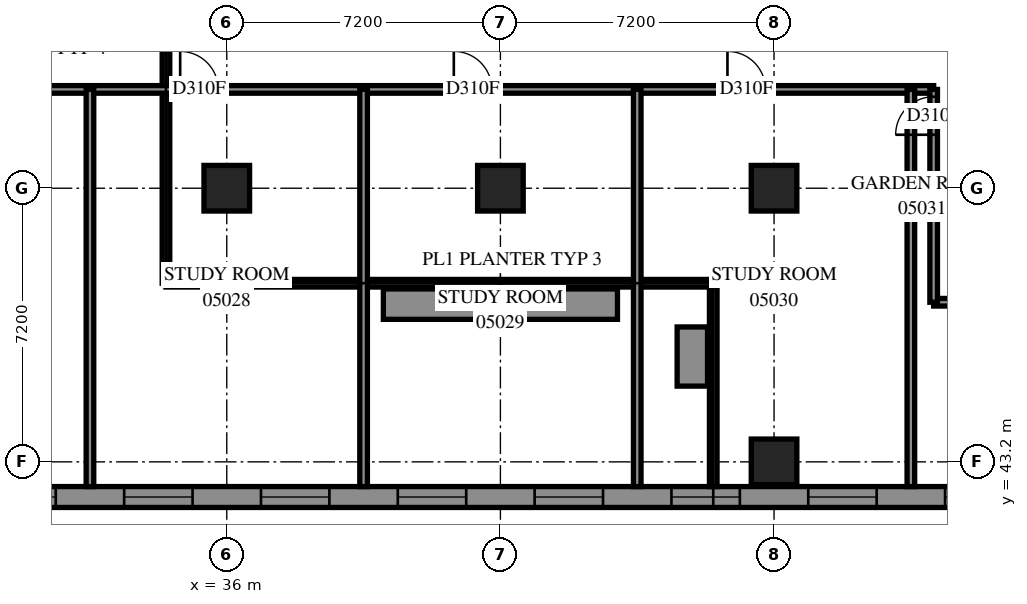
"""IFC4 building model, lengths in metres.
Left out: names, types, materials, properties, quantities, classifications, styles, units other than length and angle.
Written with IfcOpenShell. Run it as: python <this file> out.ifc"""

import sys

from ifc_helpers import new_model, si_unit, direction, frame, frame_2d, origin, origin_2d, place, context, subcontext, project, spatial, polyline, rectangle, outline, extrude, element, fill, save


model = new_model("IFC4")
c1 = context("Model", 3, precision=1e-05, world=origin(), true_north=direction((0.0, 1.0)))
c2 = subcontext(c1, "Body", "Model", "MODEL_VIEW")
j1 = project(units=[si_unit("LENGTHUNIT", "METRE"), si_unit("PLANEANGLEUNIT", "RADIAN")], contexts=[c1])
p1 = place(None, origin())
s1 = spatial("IfcSite", under=j1, at=p1, CompositionType="ELEMENT")
p2 = place(p1, origin())
s2 = spatial("IfcBuilding", under=s1, at=p2, CompositionType="ELEMENT")
p3 = place(p2, frame((0.0, 0.0, 22.8)))
s3 = spatial("IfcBuildingStorey", under=s2, at=p3, CompositionType="ELEMENT", Elevation=22.8)
for number, where, z_axis, x_axis in (
    (1, (36.0, 50.4, 0.0), (0.0, 0.0, 1.0), (1.0, 0.0, 0.0)),
    (2, (43.2, 50.4, 0.0), (0.0, 0.0, 1.0), (1.0, 0.0, 0.0)),
    (3, (50.4, 43.2, 0.0), (0.0, 0.0, 1.0), (1.0, 0.0, 0.0)),
    (4, (50.4, 50.4, 0.0), (0.0, 0.0, 1.0), (1.0, 0.0, 0.0)),
):
    element("IfcColumn", number, at=place(p3, frame(where, z_axis=z_axis, x_axis=x_axis)), inside=s3, PredefinedType="COLUMN", context=c2, shape_type="SweptSolid", body=[
        extrude(rectangle(XDim=1.2, YDim=1.2, at=origin_2d()), origin(), (0.0, 0.0, 1.0), 3.9),
    ])
p4 = place(p3, frame((0.275, 42.275, 0.0), z_axis=(0.0, 0.0, 1.0), x_axis=(1.0, 0.0, 0.0)))
e5 = element("IfcWall", 5, at=p4, inside=s3, PredefinedType="SOLIDWALL", context=c2, shape_type="SweptSolid", body=[
    extrude(outline(polyline([(-0.275, -0.275), (76.681, -0.275), (76.909, 0.275), (0.275, 0.275), (-0.275, -0.275)])), origin(), (0.0, 0.0, 1.0), 3.9),
])
p5 = place(p4, frame((1.0, 0.0, 0.7)))
e6 = element("IfcOpeningElement", 6, at=p5, cuts=e5, PredefinedType="OPENING", context=c2, shape_type="SweptSolid", body=[
    extrude(rectangle(XDim=1.8, YDim=2.4, at=frame_2d((0.9, 1.2))), frame((0.0, 0.285, 0.0), z_axis=(0.0, -1.0, 0.0), x_axis=(1.0, 0.0, 0.0)), (0.0, 0.0, 1.0), 0.57),
])
p6 = place(p4, frame((3.825, 0.0, 0.7)))
e7 = element("IfcOpeningElement", 7, at=p6, cuts=e5, PredefinedType="OPENING", context=c2, shape_type="SweptSolid", body=[
    extrude(rectangle(XDim=1.8, YDim=2.4, at=frame_2d((0.9, 1.2))), frame((0.0, 0.285, 0.0), z_axis=(0.0, -1.0, 0.0), x_axis=(1.0, 0.0, 0.0)), (0.0, 0.0, 1.0), 0.57),
])
p7 = place(p4, frame((7.825, 0.0, 0.7)))
e8 = element("IfcOpeningElement", 8, at=p7, cuts=e5, PredefinedType="OPENING", context=c2, shape_type="SweptSolid", body=[
    extrude(rectangle(XDim=1.8, YDim=2.4, at=frame_2d((0.9, 1.2))), frame((0.0, 0.285, 0.0), z_axis=(0.0, -1.0, 0.0), x_axis=(1.0, 0.0, 0.0)), (0.0, 0.0, 1.0), 0.57),
])
p8 = place(p4, frame((11.425, 0.0, 0.7)))
e9 = element("IfcOpeningElement", 9, at=p8, cuts=e5, PredefinedType="OPENING", context=c2, shape_type="SweptSolid", body=[
    extrude(rectangle(XDim=1.8, YDim=2.4, at=frame_2d((0.9, 1.2))), frame((0.0, 0.285, 0.0), z_axis=(0.0, -1.0, 0.0), x_axis=(1.0, 0.0, 0.0)), (0.0, 0.0, 1.0), 0.57),
])
p9 = place(p4, frame((15.025, 0.0, 0.7)))
e10 = element("IfcOpeningElement", 10, at=p9, cuts=e5, PredefinedType="OPENING", context=c2, shape_type="SweptSolid", body=[
    extrude(rectangle(XDim=1.8, YDim=2.4, at=frame_2d((0.9, 1.2))), frame((0.0, 0.285, 0.0), z_axis=(0.0, -1.0, 0.0), x_axis=(1.0, 0.0, 0.0)), (0.0, 0.0, 1.0), 0.57),
])
p10 = place(p4, frame((18.625, 0.0, 0.7)))
e11 = element("IfcOpeningElement", 11, at=p10, cuts=e5, PredefinedType="OPENING", context=c2, shape_type="SweptSolid", body=[
    extrude(rectangle(XDim=1.8, YDim=2.4, at=frame_2d((0.9, 1.2))), frame((0.0, 0.285, 0.0), z_axis=(0.0, -1.0, 0.0), x_axis=(1.0, 0.0, 0.0)), (0.0, 0.0, 1.0), 0.57),
])
p11 = place(p4, frame((22.225, 0.0, 0.7)))
e12 = element("IfcOpeningElement", 12, at=p11, cuts=e5, PredefinedType="OPENING", context=c2, shape_type="SweptSolid", body=[
    extrude(rectangle(XDim=1.8, YDim=2.4, at=frame_2d((0.9, 1.2))), frame((0.0, 0.285, 0.0), z_axis=(0.0, -1.0, 0.0), x_axis=(1.0, 0.0, 0.0)), (0.0, 0.0, 1.0), 0.57),
])
p12 = place(p4, frame((25.825, 0.0, 0.7)))
e13 = element("IfcOpeningElement", 13, at=p12, cuts=e5, PredefinedType="OPENING", context=c2, shape_type="SweptSolid", body=[
    extrude(rectangle(XDim=1.8, YDim=2.4, at=frame_2d((0.9, 1.2))), frame((0.0, 0.285, 0.0), z_axis=(0.0, -1.0, 0.0), x_axis=(1.0, 0.0, 0.0)), (0.0, 0.0, 1.0), 0.57),
])
p13 = place(p4, frame((29.425, 0.0, 0.7)))
e14 = element("IfcOpeningElement", 14, at=p13, cuts=e5, PredefinedType="OPENING", context=c2, shape_type="SweptSolid", body=[
    extrude(rectangle(XDim=1.8, YDim=2.4, at=frame_2d((0.9, 1.2))), frame((0.0, 0.285, 0.0), z_axis=(0.0, -1.0, 0.0), x_axis=(1.0, 0.0, 0.0)), (0.0, 0.0, 1.0), 0.57),
])
p14 = place(p4, frame((33.025, 0.0, 0.7)))
e15 = element("IfcOpeningElement", 15, at=p14, cuts=e5, PredefinedType="OPENING", context=c2, shape_type="SweptSolid", body=[
    extrude(rectangle(XDim=1.8, YDim=2.4, at=frame_2d((0.9, 1.2))), frame((0.0, 0.285, 0.0), z_axis=(0.0, -1.0, 0.0), x_axis=(1.0, 0.0, 0.0)), (0.0, 0.0, 1.0), 0.57),
])
p15 = place(p4, frame((36.625, 0.0, 0.7)))
e16 = element("IfcOpeningElement", 16, at=p15, cuts=e5, PredefinedType="OPENING", context=c2, shape_type="SweptSolid", body=[
    extrude(rectangle(XDim=1.8, YDim=2.4, at=frame_2d((0.9, 1.2))), frame((0.0, 0.285, 0.0), z_axis=(0.0, -1.0, 0.0), x_axis=(1.0, 0.0, 0.0)), (0.0, 0.0, 1.0), 0.57),
])
p16 = place(p4, frame((40.225, 0.0, 0.7)))
e17 = element("IfcOpeningElement", 17, at=p16, cuts=e5, PredefinedType="OPENING", context=c2, shape_type="SweptSolid", body=[
    extrude(rectangle(XDim=1.8, YDim=2.4, at=frame_2d((0.9, 1.2))), frame((0.0, 0.285, 0.0), z_axis=(0.0, -1.0, 0.0), x_axis=(1.0, 0.0, 0.0)), (0.0, 0.0, 1.0), 0.57),
])
p17 = place(p4, frame((43.825, 0.0, 0.7)))
e18 = element("IfcOpeningElement", 18, at=p17, cuts=e5, PredefinedType="OPENING", context=c2, shape_type="SweptSolid", body=[
    extrude(rectangle(XDim=1.8, YDim=2.4, at=frame_2d((0.9, 1.2))), frame((0.0, 0.285, 0.0), z_axis=(0.0, -1.0, 0.0), x_axis=(1.0, 0.0, 0.0)), (0.0, 0.0, 1.0), 0.57),
])
p18 = place(p4, frame((47.425, 0.0, 0.7)))
e19 = element("IfcOpeningElement", 19, at=p18, cuts=e5, PredefinedType="OPENING", context=c2, shape_type="SweptSolid", body=[
    extrude(rectangle(XDim=1.8, YDim=2.4, at=frame_2d((0.9, 1.2))), frame((0.0, 0.285, 0.0), z_axis=(0.0, -1.0, 0.0), x_axis=(1.0, 0.0, 0.0)), (0.0, 0.0, 1.0), 0.57),
])
p19 = place(p4, frame((51.025, 0.0, 0.7)))
e20 = element("IfcOpeningElement", 20, at=p19, cuts=e5, PredefinedType="OPENING", context=c2, shape_type="SweptSolid", body=[
    extrude(rectangle(XDim=1.8, YDim=2.4, at=frame_2d((0.9, 1.2))), frame((0.0, 0.285, 0.0), z_axis=(0.0, -1.0, 0.0), x_axis=(1.0, 0.0, 0.0)), (0.0, 0.0, 1.0), 0.57),
])
p20 = place(p4, frame((54.625, 0.0, 0.7)))
e21 = element("IfcOpeningElement", 21, at=p20, cuts=e5, PredefinedType="OPENING", context=c2, shape_type="SweptSolid", body=[
    extrude(rectangle(XDim=1.8, YDim=2.4, at=frame_2d((0.9, 1.2))), frame((0.0, 0.285, 0.0), z_axis=(0.0, -1.0, 0.0), x_axis=(1.0, 0.0, 0.0)), (0.0, 0.0, 1.0), 0.57),
])
p21 = place(p4, frame((58.225, 0.0, 0.7)))
e22 = element("IfcOpeningElement", 22, at=p21, cuts=e5, PredefinedType="OPENING", context=c2, shape_type="SweptSolid", body=[
    extrude(rectangle(XDim=1.8, YDim=2.4, at=frame_2d((0.9, 1.2))), frame((0.0, 0.285, 0.0), z_axis=(0.0, -1.0, 0.0), x_axis=(1.0, 0.0, 0.0)), (0.0, 0.0, 1.0), 0.57),
])
p22 = place(p4, frame((61.825, 0.0, 0.7)))
e23 = element("IfcOpeningElement", 23, at=p22, cuts=e5, PredefinedType="OPENING", context=c2, shape_type="SweptSolid", body=[
    extrude(rectangle(XDim=1.8, YDim=2.4, at=frame_2d((0.9, 1.2))), frame((0.0, 0.285, 0.0), z_axis=(0.0, -1.0, 0.0), x_axis=(1.0, 0.0, 0.0)), (0.0, 0.0, 1.0), 0.57),
])
p23 = place(p4, frame((65.425, 0.0, 0.7)))
e24 = element("IfcOpeningElement", 24, at=p23, cuts=e5, PredefinedType="OPENING", context=c2, shape_type="SweptSolid", body=[
    extrude(rectangle(XDim=1.8, YDim=2.4, at=frame_2d((0.9, 1.2))), frame((0.0, 0.285, 0.0), z_axis=(0.0, -1.0, 0.0), x_axis=(1.0, 0.0, 0.0)), (0.0, 0.0, 1.0), 0.57),
])
p24 = place(p4, frame((69.025, 0.0, 0.7)))
e25 = element("IfcOpeningElement", 25, at=p24, cuts=e5, PredefinedType="OPENING", context=c2, shape_type="SweptSolid", body=[
    extrude(rectangle(XDim=1.8, YDim=2.4, at=frame_2d((0.9, 1.2))), frame((0.0, 0.285, 0.0), z_axis=(0.0, -1.0, 0.0), x_axis=(1.0, 0.0, 0.0)), (0.0, 0.0, 1.0), 0.57),
])
p25 = place(p4, frame((72.625, 0.0, 0.7)))
e26 = element("IfcOpeningElement", 26, at=p25, cuts=e5, PredefinedType="OPENING", context=c2, shape_type="SweptSolid", body=[
    extrude(rectangle(XDim=1.8, YDim=2.4, at=frame_2d((0.9, 1.2))), frame((0.0, 0.285, 0.0), z_axis=(0.0, -1.0, 0.0), x_axis=(1.0, 0.0, 0.0)), (0.0, 0.0, 1.0), 0.57),
])
p26 = place(p3, frame((48.8, 42.55, 0.0), z_axis=(0.0, 0.0, 1.0), x_axis=(0.0, 1.0, 0.0)))
e27 = element("IfcWall", 27, at=p26, inside=s3, PredefinedType="PARAPET", context=c2, shape_type="SweptSolid", body=[
    extrude(outline(polyline([(0.0, -0.1), (5.45, -0.1), (5.25, 0.1), (0.0, 0.1), (0.0, -0.1)])), origin(), (0.0, 0.0, 1.0), 0.25),
])
p27 = place(p3, frame((48.8, 47.9, 0.0), z_axis=(0.0, 0.0, 1.0), x_axis=(-1.0, 0.0, 0.0)))
e28 = element("IfcWall", 28, at=p27, inside=s3, PredefinedType="PARAPET", context=c2, shape_type="SweptSolid", body=[
    extrude(outline(polyline([(-0.1, -0.1), (14.3, -0.1), (14.5, 0.1), (0.1, 0.1), (-0.1, -0.1)])), origin(), (0.0, 0.0, 1.0), 0.25),
])
p28 = place(p3, frame((34.4, 47.9, 0.0), z_axis=(0.0, 0.0, 1.0), x_axis=(0.0, 1.0, 0.0)))
e29 = element("IfcWall", 29, at=p28, inside=s3, PredefinedType="PARAPET", context=c2, shape_type="SweptSolid", body=[
    extrude(outline(polyline([(0.1, -0.1), (8.2, -0.1), (8.0, 0.1), (-0.1, 0.1), (0.1, -0.1)])), origin(), (0.0, 0.0, 1.0), 0.25),
])
p29 = place(p3, frame((46.28, 47.35, 0.0), z_axis=(0.0, 0.0, 1.0), x_axis=(-1.0, 0.0, 0.0)))
e30 = element("IfcWall", 30, at=p29, inside=s3, PredefinedType="SOLIDWALL", context=c2, shape_type="SweptSolid", body=[
    extrude(rectangle(XDim=6.16, YDim=0.8, at=frame_2d((3.08, 0.0))), origin(), (0.0, 0.0, 1.0), 0.65),
])
p30 = place(p3, frame((0.0, 53.0, 0.0), z_axis=(0.0, 0.0, 1.0), x_axis=(1.0, 0.0, 0.0)))
e31 = element("IfcWall", 31, at=p30, inside=s3, PredefinedType="PARTITIONING", context=c2, shape_type="SweptSolid", body=[
    extrude(rectangle(XDim=54.6, YDim=0.2, at=frame_2d((27.3, 0.0))), origin(), (0.0, 0.0, 1.0), 3.9),
])
p31 = place(p30, frame((8.689, 0.0, 0.0)))
e32 = element("IfcOpeningElement", 32, at=p31, cuts=e31, PredefinedType="OPENING", context=c2, shape_type="SweptSolid", body=[
    extrude(rectangle(XDim=1.0, YDim=2.1, at=frame_2d((0.5, 1.05))), frame((0.0, 0.11, 0.0), z_axis=(0.0, -1.0, 0.0), x_axis=(1.0, 0.0, 0.0)), (0.0, 0.0, 1.0), 0.22),
])
p32 = place(p30, frame((13.174, 0.0, 0.0)))
e33 = element("IfcOpeningElement", 33, at=p32, cuts=e31, PredefinedType="OPENING", context=c2, shape_type="SweptSolid", body=[
    extrude(rectangle(XDim=1.0, YDim=2.1, at=frame_2d((0.5, 1.05))), frame((0.0, 0.11, 0.0), z_axis=(0.0, -1.0, 0.0), x_axis=(1.0, 0.0, 0.0)), (0.0, 0.0, 1.0), 0.22),
])
p33 = place(p30, frame((20.374, 0.0, 0.0)))
e34 = element("IfcOpeningElement", 34, at=p33, cuts=e31, PredefinedType="OPENING", context=c2, shape_type="SweptSolid", body=[
    extrude(rectangle(XDim=1.0, YDim=2.1, at=frame_2d((0.5, 1.05))), frame((0.0, 0.11, 0.0), z_axis=(0.0, -1.0, 0.0), x_axis=(1.0, 0.0, 0.0)), (0.0, 0.0, 1.0), 0.22),
])
p34 = place(p30, frame((27.574, 0.0, 0.0)))
e35 = element("IfcOpeningElement", 35, at=p34, cuts=e31, PredefinedType="OPENING", context=c2, shape_type="SweptSolid", body=[
    extrude(rectangle(XDim=1.0, YDim=2.1, at=frame_2d((0.5, 1.05))), frame((0.0, 0.11, 0.0), z_axis=(0.0, -1.0, 0.0), x_axis=(1.0, 0.0, 0.0)), (0.0, 0.0, 1.0), 0.22),
])
p35 = place(p30, frame((34.774, 0.0, 0.0)))
e36 = element("IfcOpeningElement", 36, at=p35, cuts=e31, PredefinedType="OPENING", context=c2, shape_type="SweptSolid", body=[
    extrude(rectangle(XDim=1.0, YDim=2.1, at=frame_2d((0.5, 1.05))), frame((0.0, 0.11, 0.0), z_axis=(0.0, -1.0, 0.0), x_axis=(1.0, 0.0, 0.0)), (0.0, 0.0, 1.0), 0.22),
])
p36 = place(p30, frame((41.974, 0.0, 0.0)))
e37 = element("IfcOpeningElement", 37, at=p36, cuts=e31, PredefinedType="OPENING", context=c2, shape_type="SweptSolid", body=[
    extrude(rectangle(XDim=1.0, YDim=2.1, at=frame_2d((0.5, 1.05))), frame((0.0, 0.11, 0.0), z_axis=(0.0, -1.0, 0.0), x_axis=(1.0, 0.0, 0.0)), (0.0, 0.0, 1.0), 0.22),
])
p37 = place(p30, frame((49.174, 0.0, 0.0)))
e38 = element("IfcOpeningElement", 38, at=p37, cuts=e31, PredefinedType="OPENING", context=c2, shape_type="SweptSolid", body=[
    extrude(rectangle(XDim=1.0, YDim=2.1, at=frame_2d((0.5, 1.05))), frame((0.0, 0.11, 0.0), z_axis=(0.0, -1.0, 0.0), x_axis=(1.0, 0.0, 0.0)), (0.0, 0.0, 1.0), 0.22),
])
p38 = place(p30, frame((2.406, 0.0, 0.0)))
e39 = element("IfcOpeningElement", 39, at=p38, cuts=e31, PredefinedType="OPENING", context=c2, shape_type="SweptSolid", body=[
    extrude(rectangle(XDim=1.0, YDim=2.1, at=frame_2d((0.5, 1.05))), frame((0.0, 0.11, 0.0), z_axis=(0.0, -1.0, 0.0), x_axis=(1.0, 0.0, 0.0)), (0.0, 0.0, 1.0), 0.22),
])
p39 = place(p30, frame((4.748, 0.0, 0.0)))
e40 = element("IfcOpeningElement", 40, at=p39, cuts=e31, PredefinedType="OPENING", context=c2, shape_type="SweptSolid", body=[
    extrude(rectangle(XDim=1.0, YDim=2.1, at=frame_2d((0.5, 1.05))), frame((0.0, 0.11, 0.0), z_axis=(0.0, -1.0, 0.0), x_axis=(1.0, 0.0, 0.0)), (0.0, 0.0, 1.0), 0.22),
])
p40 = place(p3, frame((54.6, 47.4, 0.0), z_axis=(0.0, 0.0, 1.0), x_axis=(1.0, 0.0, 0.0)))
e41 = element("IfcWall", 41, at=p40, inside=s3, PredefinedType="PARTITIONING", context=c2, shape_type="SweptSolid", body=[
    extrude(rectangle(XDim=19.502, YDim=0.2, at=frame_2d((9.751, 0.0))), origin(), (0.0, 0.0, 1.0), 3.9),
])
p41 = place(p40, frame((6.886, 0.0, 0.0)))
e42 = element("IfcOpeningElement", 42, at=p41, cuts=e41, PredefinedType="OPENING", context=c2, shape_type="SweptSolid", body=[
    extrude(rectangle(XDim=1.0, YDim=2.1, at=frame_2d((0.5, 1.05))), frame((0.0, 0.11, 0.0), z_axis=(0.0, -1.0, 0.0), x_axis=(1.0, 0.0, 0.0)), (0.0, 0.0, 1.0), 0.22),
])
p42 = place(p40, frame((14.086, 0.0, 0.0)))
e43 = element("IfcOpeningElement", 43, at=p42, cuts=e41, PredefinedType="OPENING", context=c2, shape_type="SweptSolid", body=[
    extrude(rectangle(XDim=1.0, YDim=2.1, at=frame_2d((0.5, 1.05))), frame((0.0, 0.11, 0.0), z_axis=(0.0, -1.0, 0.0), x_axis=(1.0, 0.0, 0.0)), (0.0, 0.0, 1.0), 0.22),
])
for number, where, z_axis, x_axis in (
    (44, (32.4, 42.55, 0.0), (0.0, 0.0, 1.0), (0.0, 1.0, 0.0)),
    (45, (39.6, 42.55, 0.0), (0.0, 0.0, 1.0), (0.0, 1.0, 0.0)),
    (46, (46.8, 42.55, 0.0), (0.0, 0.0, 1.0), (0.0, 1.0, 0.0)),
    (47, (54.0, 42.55, 0.0), (0.0, 0.0, 1.0), (0.0, 1.0, 0.0)),
):
    element("IfcWall", number, at=place(p3, frame(where, z_axis=z_axis, x_axis=x_axis)), inside=s3, PredefinedType="PARTITIONING", context=c2, shape_type="SweptSolid", body=[
        extrude(rectangle(XDim=10.45, YDim=0.2, at=frame_2d((5.225, 0.0))), origin(), (0.0, 0.0, 1.0), 3.9),
    ])
p43 = place(p3, frame((54.6, 47.4, 0.0), z_axis=(0.0, 0.0, 1.0), x_axis=(0.0, 1.0, 0.0)))
e48 = element("IfcWall", 48, at=p43, inside=s3, PredefinedType="PARTITIONING", context=c2, shape_type="SweptSolid", body=[
    extrude(rectangle(XDim=5.6, YDim=0.2, at=frame_2d((2.8, 0.0))), origin(), (0.0, 0.0, 1.0), 3.9),
])
p44 = place(p43, frame((4.407, 0.0, 0.0)))
e49 = element("IfcOpeningElement", 49, at=p44, cuts=e48, PredefinedType="OPENING", context=c2, shape_type="SweptSolid", body=[
    extrude(rectangle(XDim=1.0, YDim=2.1, at=frame_2d((0.5, 1.05))), frame((0.0, 0.11, 0.0), z_axis=(0.0, -1.0, 0.0), x_axis=(1.0, 0.0, 0.0)), (0.0, 0.0, 1.0), 0.22),
])
p45 = place(p3, frame((48.25, 45.193, 0.0), z_axis=(0.0, 0.0, 1.0), x_axis=(0.0, 1.0, 0.0)))
e50 = element("IfcWall", 50, at=p45, inside=s3, PredefinedType="SOLIDWALL", context=c2, shape_type="SweptSolid", body=[
    extrude(outline(polyline([(0.0, -0.4), (1.557, -0.4), (1.557, 0.4), (0.0, 0.4), (0.0, -0.4)])), origin(), (0.0, 0.0, 1.0), 0.65),
])
p46 = place(p13, origin())
e51 = element("IfcWindow", 51, at=p46, inside=s3, PartitioningType="SINGLE_PANEL", PredefinedType="WINDOW", context=c2, shape_type="SweptSolid", body=[
    extrude(rectangle(XDim=1.8, YDim=2.4, at=frame_2d((0.9, 1.2))), frame((0.0, 0.155, 0.0), z_axis=(0.0, -1.0, 0.0), x_axis=(1.0, 0.0, 0.0)), (0.0, 0.0, 1.0), 0.06),
])
fill(e14, e51)
p47 = place(p14, origin())
e52 = element("IfcWindow", 52, at=p47, inside=s3, PartitioningType="SINGLE_PANEL", PredefinedType="WINDOW", context=c2, shape_type="SweptSolid", body=[
    extrude(rectangle(XDim=1.8, YDim=2.4, at=frame_2d((0.9, 1.2))), frame((0.0, 0.155, 0.0), z_axis=(0.0, -1.0, 0.0), x_axis=(1.0, 0.0, 0.0)), (0.0, 0.0, 1.0), 0.06),
])
fill(e15, e52)
p48 = place(p15, origin())
e53 = element("IfcWindow", 53, at=p48, inside=s3, PartitioningType="SINGLE_PANEL", PredefinedType="WINDOW", context=c2, shape_type="SweptSolid", body=[
    extrude(rectangle(XDim=1.8, YDim=2.4, at=frame_2d((0.9, 1.2))), frame((0.0, 0.155, 0.0), z_axis=(0.0, -1.0, 0.0), x_axis=(1.0, 0.0, 0.0)), (0.0, 0.0, 1.0), 0.06),
])
fill(e16, e53)
p49 = place(p16, origin())
e54 = element("IfcWindow", 54, at=p49, inside=s3, PartitioningType="SINGLE_PANEL", PredefinedType="WINDOW", context=c2, shape_type="SweptSolid", body=[
    extrude(rectangle(XDim=1.8, YDim=2.4, at=frame_2d((0.9, 1.2))), frame((0.0, 0.155, 0.0), z_axis=(0.0, -1.0, 0.0), x_axis=(1.0, 0.0, 0.0)), (0.0, 0.0, 1.0), 0.06),
])
fill(e17, e54)
p50 = place(p17, origin())
e55 = element("IfcWindow", 55, at=p50, inside=s3, PartitioningType="SINGLE_PANEL", PredefinedType="WINDOW", context=c2, shape_type="SweptSolid", body=[
    extrude(rectangle(XDim=1.8, YDim=2.4, at=frame_2d((0.9, 1.2))), frame((0.0, 0.155, 0.0), z_axis=(0.0, -1.0, 0.0), x_axis=(1.0, 0.0, 0.0)), (0.0, 0.0, 1.0), 0.06),
])
fill(e18, e55)
p51 = place(p18, origin())
e56 = element("IfcWindow", 56, at=p51, inside=s3, PartitioningType="SINGLE_PANEL", PredefinedType="WINDOW", context=c2, shape_type="SweptSolid", body=[
    extrude(rectangle(XDim=1.8, YDim=2.4, at=frame_2d((0.9, 1.2))), frame((0.0, 0.155, 0.0), z_axis=(0.0, -1.0, 0.0), x_axis=(1.0, 0.0, 0.0)), (0.0, 0.0, 1.0), 0.06),
])
fill(e19, e56)
p52 = place(p19, origin())
e57 = element("IfcWindow", 57, at=p52, inside=s3, PartitioningType="SINGLE_PANEL", PredefinedType="WINDOW", context=c2, shape_type="SweptSolid", body=[
    extrude(rectangle(XDim=1.8, YDim=2.4, at=frame_2d((0.9, 1.2))), frame((0.0, 0.155, 0.0), z_axis=(0.0, -1.0, 0.0), x_axis=(1.0, 0.0, 0.0)), (0.0, 0.0, 1.0), 0.06),
])
fill(e20, e57)
p53 = place(p20, origin())
e58 = element("IfcWindow", 58, at=p53, inside=s3, PartitioningType="SINGLE_PANEL", PredefinedType="WINDOW", context=c2, shape_type="SweptSolid", body=[
    extrude(rectangle(XDim=1.8, YDim=2.4, at=frame_2d((0.9, 1.2))), frame((0.0, 0.155, 0.0), z_axis=(0.0, -1.0, 0.0), x_axis=(1.0, 0.0, 0.0)), (0.0, 0.0, 1.0), 0.06),
])
fill(e21, e58)
p54 = place(p35, origin())
e59 = element("IfcDoor", 59, at=p54, inside=s3, OperationType="SINGLE_SWING_RIGHT", PredefinedType="DOOR", context=c2, shape_type="SweptSolid", body=[
    extrude(rectangle(XDim=1.0, YDim=2.1, at=frame_2d((0.5, 1.05))), frame((0.0, 0.025, 0.0), z_axis=(0.0, -1.0, 0.0), x_axis=(1.0, 0.0, 0.0)), (0.0, 0.0, 1.0), 0.05),
])
fill(e36, e59)
p55 = place(p36, origin())
e60 = element("IfcDoor", 60, at=p55, inside=s3, OperationType="SINGLE_SWING_RIGHT", PredefinedType="DOOR", context=c2, shape_type="SweptSolid", body=[
    extrude(rectangle(XDim=1.0, YDim=2.1, at=frame_2d((0.5, 1.05))), frame((0.0, 0.025, 0.0), z_axis=(0.0, -1.0, 0.0), x_axis=(1.0, 0.0, 0.0)), (0.0, 0.0, 1.0), 0.05),
])
fill(e37, e60)
p56 = place(p37, origin())
e61 = element("IfcDoor", 61, at=p56, inside=s3, OperationType="SINGLE_SWING_RIGHT", PredefinedType="DOOR", context=c2, shape_type="SweptSolid", body=[
    extrude(rectangle(XDim=1.0, YDim=2.1, at=frame_2d((0.5, 1.05))), frame((0.0, 0.025, 0.0), z_axis=(0.0, -1.0, 0.0), x_axis=(1.0, 0.0, 0.0)), (0.0, 0.0, 1.0), 0.05),
])
fill(e38, e61)
p57 = place(p44, origin())
e62 = element("IfcDoor", 62, at=p57, inside=s3, OperationType="SINGLE_SWING_RIGHT", PredefinedType="DOOR", context=c2, shape_type="SweptSolid", body=[
    extrude(rectangle(XDim=1.0, YDim=2.1, at=frame_2d((0.5, 1.05))), frame((0.0, 0.025, 0.0), z_axis=(0.0, -1.0, 0.0), x_axis=(1.0, 0.0, 0.0)), (0.0, 0.0, 1.0), 0.05),
])
fill(e49, e62)
save(model, sys.argv[1])
